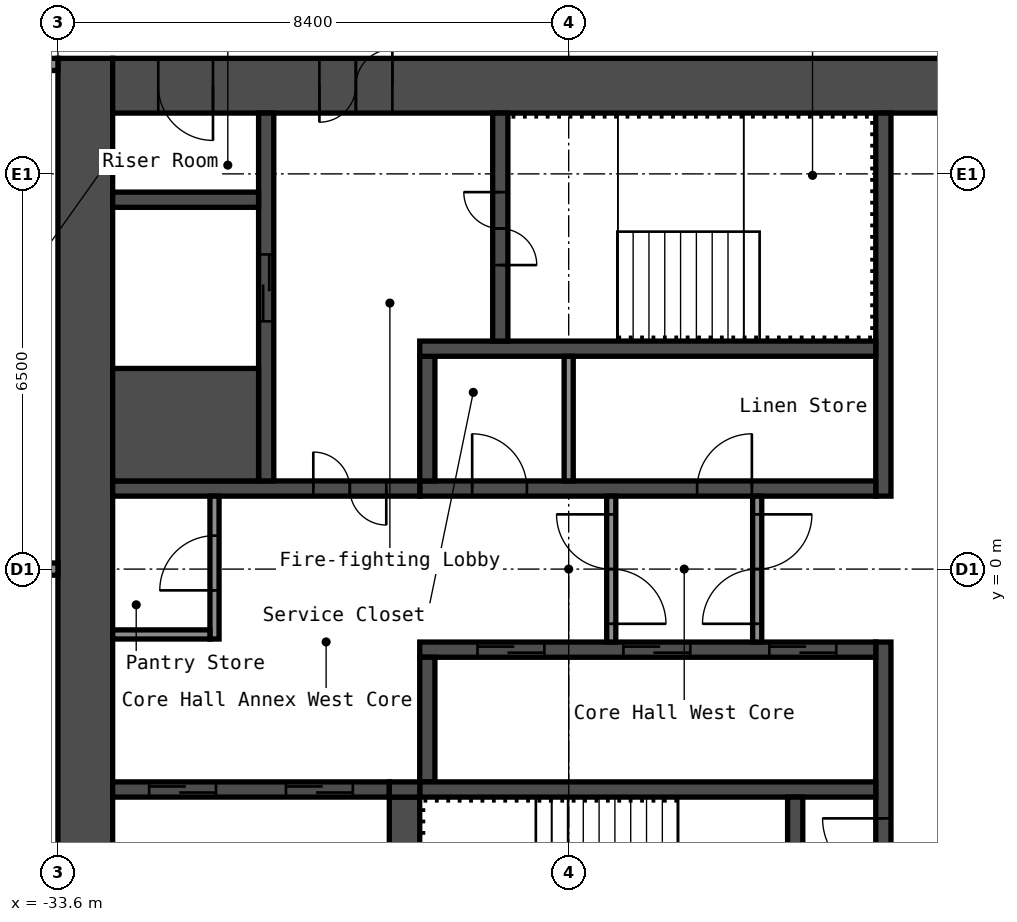
"""IFC4 building model, lengths in metres.
Left out: names, types, materials, properties, quantities, classifications, styles, units other than length and angle.
Written with IfcOpenShell. Run it as: python <this file> out.ifc"""

import sys

from ifc_helpers import new_model, si_unit, direction, frame, frame_2d, origin, place, context, subcontext, project, spatial, rectangle, extrude, element, fill, save


model = new_model("IFC4")
c1 = context("Model", 3, precision=1e-05, world=origin(), true_north=direction((0.0, 1.0)))
c2 = subcontext(c1, "Body", "Model", "MODEL_VIEW")
j1 = project(units=[si_unit("LENGTHUNIT", "METRE"), si_unit("PLANEANGLEUNIT", "RADIAN")], contexts=[c1])
p1 = place(None, origin())
s1 = spatial("IfcSite", under=j1, at=p1, CompositionType="ELEMENT")
p2 = place(p1, origin())
s2 = spatial("IfcBuilding", under=s1, at=p2, CompositionType="ELEMENT")
p3 = place(p2, frame((0.0, 0.0, 147.0)))
s3 = spatial("IfcBuildingStorey", under=s2, at=p3, CompositionType="ELEMENT", Elevation=147.0)
p4 = place(p3, frame((-33.15, -8.4, 0.0), z_axis=(0.0, 0.0, 1.0), x_axis=(0.0, 1.0, 0.0)))
e1 = element("IfcWall", 1, at=p4, inside=s3, PredefinedType="SHEAR", context=c2, shape_type="SweptSolid", body=[
    extrude(rectangle(XDim=16.8, YDim=0.9, at=frame_2d((8.4, 0.0))), origin(), (0.0, 0.0, 1.0), 2.75),
])
p5 = place(p3, frame((-32.7, 7.95, 0.0), z_axis=(0.0, 0.0, 1.0), x_axis=(1.0, 0.0, 0.0)))
e2 = element("IfcWall", 2, at=p5, inside=s3, PredefinedType="SHEAR", context=c2, shape_type="SweptSolid", body=[
    extrude(rectangle(XDim=15.0, YDim=0.9, at=frame_2d((7.5, 0.0))), origin(), (0.0, 0.0, 1.0), 2.75),
])
p6 = place(p5, frame((3.4, 0.0, 0.0)))
e3 = element("IfcOpeningElement", 3, at=p6, cuts=e2, PredefinedType="OPENING", context=c2, shape_type="SweptSolid", body=[
    extrude(rectangle(XDim=1.2, YDim=2.1, at=frame_2d((0.6, 1.05))), frame((0.0, 0.46, 0.0), z_axis=(0.0, -1.0, 0.0), x_axis=(1.0, 0.0, 0.0)), (0.0, 0.0, 1.0), 0.92),
])
p7 = place(p5, frame((0.75, 0.0, 0.0)))
e4 = element("IfcOpeningElement", 4, at=p7, cuts=e2, PredefinedType="OPENING", context=c2, shape_type="SweptSolid", body=[
    extrude(rectangle(XDim=0.9, YDim=2.1, at=frame_2d((0.45, 1.05))), frame((0.0, 0.46, 0.0), z_axis=(0.0, -1.0, 0.0), x_axis=(1.0, 0.0, 0.0)), (0.0, 0.0, 1.0), 0.92),
])
p8 = place(p3, frame((-20.025, 1.2, 0.0), z_axis=(0.0, 0.0, 1.0), x_axis=(0.0, 1.0, 0.0)))
e5 = element("IfcWall", 5, at=p8, inside=s3, PredefinedType="SHEAR", context=c2, shape_type="SweptSolid", body=[
    extrude(rectangle(XDim=6.3, YDim=0.25, at=frame_2d((3.15, 0.0))), origin(), (0.0, 0.0, 1.0), 2.75),
])
p9 = place(p3, frame((-20.025, -7.5, 0.0), z_axis=(0.0, 0.0, 1.0), x_axis=(0.0, 1.0, 0.0)))
e6 = element("IfcWall", 6, at=p9, inside=s3, PredefinedType="SHEAR", context=c2, shape_type="SweptSolid", body=[
    extrude(rectangle(XDim=6.3, YDim=0.25, at=frame_2d((3.15, 0.0))), origin(), (0.0, 0.0, 1.0), 2.75),
])
p10 = place(p9, frame((2.4, 0.0, 0.0)))
e7 = element("IfcOpeningElement", 7, at=p10, cuts=e6, PredefinedType="OPENING", context=c2, shape_type="SweptSolid", body=[
    extrude(rectangle(XDim=1.0, YDim=2.1, at=frame_2d((0.5, 1.05))), frame((0.0, 0.135, 0.0), z_axis=(0.0, -1.0, 0.0), x_axis=(1.0, 0.0, 0.0)), (0.0, 0.0, 1.0), 0.27),
])
p11 = place(p3, frame((-27.65, 1.325, 0.0), z_axis=(0.0, 0.0, 1.0), x_axis=(1.0, 0.0, 0.0)))
e8 = element("IfcWall", 8, at=p11, inside=s3, PredefinedType="SHEAR", context=c2, shape_type="SweptSolid", body=[
    extrude(rectangle(XDim=7.5, YDim=0.25, at=frame_2d((3.75, 0.0))), origin(), (0.0, 0.0, 1.0), 2.75),
])
p12 = place(p11, frame((4.562, 0.0, 0.0)))
e9 = element("IfcOpeningElement", 9, at=p12, cuts=e8, PredefinedType="OPENING", context=c2, shape_type="SweptSolid", body=[
    extrude(rectangle(XDim=0.9, YDim=2.1, at=frame_2d((0.45, 1.05))), frame((0.0, 0.135, 0.0), z_axis=(0.0, -1.0, 0.0), x_axis=(1.0, 0.0, 0.0)), (0.0, 0.0, 1.0), 0.27),
])
p13 = place(p11, frame((0.863, 0.0, 0.0)))
e10 = element("IfcOpeningElement", 10, at=p13, cuts=e8, PredefinedType="OPENING", context=c2, shape_type="SweptSolid", body=[
    extrude(rectangle(XDim=0.9, YDim=2.1, at=frame_2d((0.45, 1.05))), frame((0.0, 0.135, 0.0), z_axis=(0.0, -1.0, 0.0), x_axis=(1.0, 0.0, 0.0)), (0.0, 0.0, 1.0), 0.27),
])
p14 = place(p3, frame((-27.525, 1.45, 0.0), z_axis=(0.0, 0.0, 1.0), x_axis=(0.0, 1.0, 0.0)))
e11 = element("IfcWall", 11, at=p14, inside=s3, PredefinedType="SHEAR", context=c2, shape_type="SweptSolid", body=[
    extrude(rectangle(XDim=2.05, YDim=0.25, at=frame_2d((1.025, 0.0))), origin(), (0.0, 0.0, 1.0), 2.75),
])
p15 = place(p3, frame((-27.65, 3.625, 0.0), z_axis=(0.0, 0.0, 1.0), x_axis=(1.0, 0.0, 0.0)))
e12 = element("IfcWall", 12, at=p15, inside=s3, PredefinedType="SHEAR", context=c2, shape_type="SweptSolid", body=[
    extrude(rectangle(XDim=7.5, YDim=0.25, at=frame_2d((3.75, 0.0))), origin(), (0.0, 0.0, 1.0), 2.75),
])
p16 = place(p3, frame((-26.325, 3.75, 0.0), z_axis=(0.0, 0.0, 1.0), x_axis=(0.0, 1.0, 0.0)))
e13 = element("IfcWall", 13, at=p16, inside=s3, PredefinedType="SHEAR", context=c2, shape_type="SweptSolid", body=[
    extrude(rectangle(XDim=3.75, YDim=0.25, at=frame_2d((1.875, 0.0))), origin(), (0.0, 0.0, 1.0), 2.75),
])
p17 = place(p16, frame((1.25, 0.0, 0.0)))
e14 = element("IfcOpeningElement", 14, at=p17, cuts=e13, PredefinedType="OPENING", context=c2, shape_type="SweptSolid", body=[
    extrude(rectangle(XDim=1.2, YDim=2.1, at=frame_2d((0.6, 1.05))), frame((0.0, 0.135, 0.0), z_axis=(0.0, -1.0, 0.0), x_axis=(1.0, 0.0, 0.0)), (0.0, 0.0, 1.0), 0.27),
])
p18 = place(p3, frame((-32.7, 1.325, 0.0), z_axis=(0.0, 0.0, 1.0), x_axis=(1.0, 0.0, 0.0)))
e15 = element("IfcWall", 15, at=p18, inside=s3, PredefinedType="SHEAR", context=c2, shape_type="SweptSolid", body=[
    extrude(rectangle(XDim=5.05, YDim=0.25, at=frame_2d((2.525, 0.0))), origin(), (0.0, 0.0, 1.0), 2.75),
])
p19 = place(p18, frame((3.3, 0.0, 0.0)))
e16 = element("IfcOpeningElement", 16, at=p19, cuts=e15, PredefinedType="OPENING", context=c2, shape_type="SweptSolid", body=[
    extrude(rectangle(XDim=1.2, YDim=2.1, at=frame_2d((0.6, 1.05))), frame((0.0, 0.135, 0.0), z_axis=(0.0, -1.0, 0.0), x_axis=(1.0, 0.0, 0.0)), (0.0, 0.0, 1.0), 0.27),
])
p20 = place(p3, frame((-30.175, 1.45, 0.0), z_axis=(0.0, 0.0, 1.0), x_axis=(0.0, 1.0, 0.0)))
e17 = element("IfcWall", 17, at=p20, inside=s3, PredefinedType="SHEAR", context=c2, shape_type="SweptSolid", body=[
    extrude(rectangle(XDim=6.05, YDim=0.25, at=frame_2d((3.025, 0.0))), origin(), (0.0, 0.0, 1.0), 2.75),
])
p21 = place(p20, frame((2.625, 0.0, 0.0)))
e18 = element("IfcOpeningElement", 18, at=p21, cuts=e17, PredefinedType="OPENING", context=c2, shape_type="SweptSolid", body=[
    extrude(rectangle(XDim=1.1, YDim=2.1, at=frame_2d((0.55, 1.05))), frame((0.0, 0.135, 0.0), z_axis=(0.0, -1.0, 0.0), x_axis=(1.0, 0.0, 0.0)), (0.0, 0.0, 1.0), 0.27),
])
p22 = place(p3, frame((-32.7, 2.375, 0.0), z_axis=(0.0, 0.0, 1.0), x_axis=(1.0, 0.0, 0.0)))
e19 = element("IfcWall", 19, at=p22, inside=s3, PredefinedType="SHEAR", context=c2, shape_type="SweptSolid", body=[
    extrude(rectangle(XDim=2.4, YDim=1.85, at=frame_2d((1.2, 0.0))), origin(), (0.0, 0.0, 1.0), 2.75),
])
p23 = place(p3, frame((-32.7, 6.075, 0.0), z_axis=(0.0, 0.0, 1.0), x_axis=(1.0, 0.0, 0.0)))
e20 = element("IfcWall", 20, at=p23, inside=s3, PredefinedType="SHEAR", context=c2, shape_type="SweptSolid", body=[
    extrude(rectangle(XDim=2.4, YDim=0.25, at=frame_2d((1.2, 0.0))), origin(), (0.0, 0.0, 1.0), 2.75),
])
p24 = place(p3, frame((-27.65, -1.325, 0.0), z_axis=(0.0, 0.0, 1.0), x_axis=(1.0, 0.0, 0.0)))
e21 = element("IfcWall", 21, at=p24, inside=s3, PredefinedType="SHEAR", context=c2, shape_type="SweptSolid", body=[
    extrude(rectangle(XDim=7.5, YDim=0.25, at=frame_2d((3.75, 0.0))), origin(), (0.0, 0.0, 1.0), 2.75),
])
p25 = place(p24, frame((5.75, 0.0, 0.0)))
e22 = element("IfcOpeningElement", 22, at=p25, cuts=e21, PredefinedType="OPENING", context=c2, shape_type="SweptSolid", body=[
    extrude(rectangle(XDim=1.1, YDim=2.1, at=frame_2d((0.55, 1.05))), frame((0.0, 0.135, 0.0), z_axis=(0.0, -1.0, 0.0), x_axis=(1.0, 0.0, 0.0)), (0.0, 0.0, 1.0), 0.27),
])
p26 = place(p24, frame((3.35, 0.0, 0.0)))
e23 = element("IfcOpeningElement", 23, at=p26, cuts=e21, PredefinedType="OPENING", context=c2, shape_type="SweptSolid", body=[
    extrude(rectangle(XDim=1.1, YDim=2.1, at=frame_2d((0.55, 1.05))), frame((0.0, 0.135, 0.0), z_axis=(0.0, -1.0, 0.0), x_axis=(1.0, 0.0, 0.0)), (0.0, 0.0, 1.0), 0.27),
])
p27 = place(p24, frame((0.95, 0.0, 0.0)))
e24 = element("IfcOpeningElement", 24, at=p27, cuts=e21, PredefinedType="OPENING", context=c2, shape_type="SweptSolid", body=[
    extrude(rectangle(XDim=1.1, YDim=2.1, at=frame_2d((0.55, 1.05))), frame((0.0, 0.135, 0.0), z_axis=(0.0, -1.0, 0.0), x_axis=(1.0, 0.0, 0.0)), (0.0, 0.0, 1.0), 0.27),
])
p28 = place(p3, frame((-27.525, -3.5, 0.0), z_axis=(0.0, 0.0, 1.0), x_axis=(0.0, 1.0, 0.0)))
e25 = element("IfcWall", 25, at=p28, inside=s3, PredefinedType="SHEAR", context=c2, shape_type="SweptSolid", body=[
    extrude(rectangle(XDim=2.05, YDim=0.25, at=frame_2d((1.025, 0.0))), origin(), (0.0, 0.0, 1.0), 2.75),
])
p29 = place(p3, frame((-27.65, -3.625, 0.0), z_axis=(0.0, 0.0, 1.0), x_axis=(1.0, 0.0, 0.0)))
e26 = element("IfcWall", 26, at=p29, inside=s3, PredefinedType="SHEAR", context=c2, shape_type="SweptSolid", body=[
    extrude(rectangle(XDim=7.5, YDim=0.25, at=frame_2d((3.75, 0.0))), origin(), (0.0, 0.0, 1.0), 2.75),
])
p30 = place(p3, frame((-21.475, -7.5, 0.0), z_axis=(0.0, 0.0, 1.0), x_axis=(0.0, 1.0, 0.0)))
e27 = element("IfcWall", 27, at=p30, inside=s3, PredefinedType="SHEAR", context=c2, shape_type="SweptSolid", body=[
    extrude(rectangle(XDim=3.75, YDim=0.25, at=frame_2d((1.875, 0.0))), origin(), (0.0, 0.0, 1.0), 2.75),
])
p31 = place(p30, frame((1.3, 0.0, 0.0)))
e28 = element("IfcOpeningElement", 28, at=p31, cuts=e27, PredefinedType="OPENING", context=c2, shape_type="SweptSolid", body=[
    extrude(rectangle(XDim=1.2, YDim=2.1, at=frame_2d((0.6, 1.05))), frame((0.0, 0.135, 0.0), z_axis=(0.0, -1.0, 0.0), x_axis=(1.0, 0.0, 0.0)), (0.0, 0.0, 1.0), 0.27),
])
p32 = place(p3, frame((-27.9, -7.5, 0.0), z_axis=(0.0, 0.0, 1.0), x_axis=(0.0, 1.0, 0.0)))
e29 = element("IfcWall", 29, at=p32, inside=s3, PredefinedType="SHEAR", context=c2, shape_type="SweptSolid", body=[
    extrude(rectangle(XDim=3.75, YDim=0.5, at=frame_2d((1.875, 0.0))), origin(), (0.0, 0.0, 1.0), 2.75),
])
p33 = place(p3, frame((-32.7, -3.625, 0.0), z_axis=(0.0, 0.0, 1.0), x_axis=(1.0, 0.0, 0.0)))
e30 = element("IfcWall", 30, at=p33, inside=s3, PredefinedType="SHEAR", context=c2, shape_type="SweptSolid", body=[
    extrude(rectangle(XDim=4.55, YDim=0.25, at=frame_2d((2.275, 0.0))), origin(), (0.0, 0.0, 1.0), 2.75),
])
p34 = place(p33, frame((2.85, 0.0, 0.0)))
e31 = element("IfcOpeningElement", 31, at=p34, cuts=e30, PredefinedType="OPENING", context=c2, shape_type="SweptSolid", body=[
    extrude(rectangle(XDim=1.1, YDim=2.1, at=frame_2d((0.55, 1.05))), frame((0.0, 0.135, 0.0), z_axis=(0.0, -1.0, 0.0), x_axis=(1.0, 0.0, 0.0)), (0.0, 0.0, 1.0), 0.27),
])
p35 = place(p33, frame((0.6, 0.0, 0.0)))
e32 = element("IfcOpeningElement", 32, at=p35, cuts=e30, PredefinedType="OPENING", context=c2, shape_type="SweptSolid", body=[
    extrude(rectangle(XDim=1.1, YDim=2.1, at=frame_2d((0.55, 1.05))), frame((0.0, 0.135, 0.0), z_axis=(0.0, -1.0, 0.0), x_axis=(1.0, 0.0, 0.0)), (0.0, 0.0, 1.0), 0.27),
])
p36 = place(p3, frame((-28.15, -3.625, 0.0), z_axis=(0.0, 0.0, 1.0), x_axis=(1.0, 0.0, 0.0)))
e33 = element("IfcWall", 33, at=p36, inside=s3, PredefinedType="SHEAR", context=c2, shape_type="SweptSolid", body=[
    extrude(rectangle(XDim=0.5, YDim=0.25, at=frame_2d((0.25, 0.0))), origin(), (0.0, 0.0, 1.0), 2.75),
])
p37 = place(p3, frame((-22.1, -1.2, 0.0), z_axis=(0.0, 0.0, 1.0), x_axis=(0.0, 1.0, 0.0)))
e34 = element("IfcWall", 34, at=p37, inside=s3, PredefinedType="PARTITIONING", context=c2, shape_type="SweptSolid", body=[
    extrude(rectangle(XDim=2.4, YDim=0.15, at=frame_2d((1.2, 0.0))), origin(), (0.0, 0.0, 1.0), 2.75),
])
p38 = place(p37, frame((0.3, 0.0, 0.0)))
e35 = element("IfcOpeningElement", 35, at=p38, cuts=e34, PredefinedType="OPENING", context=c2, shape_type="SweptSolid", body=[
    extrude(rectangle(XDim=1.8, YDim=2.1, at=frame_2d((0.9, 1.05))), frame((0.0, 0.085, 0.0), z_axis=(0.0, -1.0, 0.0), x_axis=(1.0, 0.0, 0.0)), (0.0, 0.0, 1.0), 0.17),
])
p39 = place(p3, frame((-24.5, -1.2, 0.0), z_axis=(0.0, 0.0, 1.0), x_axis=(0.0, 1.0, 0.0)))
e36 = element("IfcWall", 36, at=p39, inside=s3, PredefinedType="PARTITIONING", context=c2, shape_type="SweptSolid", body=[
    extrude(rectangle(XDim=2.4, YDim=0.15, at=frame_2d((1.2, 0.0))), origin(), (0.0, 0.0, 1.0), 2.75),
])
p40 = place(p39, frame((0.3, 0.0, 0.0)))
e37 = element("IfcOpeningElement", 37, at=p40, cuts=e36, PredefinedType="OPENING", context=c2, shape_type="SweptSolid", body=[
    extrude(rectangle(XDim=1.8, YDim=2.1, at=frame_2d((0.9, 1.05))), frame((0.0, 0.085, 0.0), z_axis=(0.0, -1.0, 0.0), x_axis=(1.0, 0.0, 0.0)), (0.0, 0.0, 1.0), 0.17),
])
p41 = place(p3, frame((-31.025, -1.15, 0.0), z_axis=(0.0, 0.0, 1.0), x_axis=(0.0, 1.0, 0.0)))
e38 = element("IfcWall", 38, at=p41, inside=s3, PredefinedType="PARTITIONING", context=c2, shape_type="SweptSolid", body=[
    extrude(rectangle(XDim=2.35, YDim=0.15, at=frame_2d((1.175, 0.0))), origin(), (0.0, 0.0, 1.0), 2.75),
])
p42 = place(p41, frame((0.8, 0.0, 0.0)))
e39 = element("IfcOpeningElement", 39, at=p42, cuts=e38, PredefinedType="OPENING", context=c2, shape_type="SweptSolid", body=[
    extrude(rectangle(XDim=0.9, YDim=2.1, at=frame_2d((0.45, 1.05))), frame((0.0, 0.085, 0.0), z_axis=(0.0, -1.0, 0.0), x_axis=(1.0, 0.0, 0.0)), (0.0, 0.0, 1.0), 0.17),
])
p43 = place(p3, frame((-32.7, -1.075, 0.0), z_axis=(0.0, 0.0, 1.0), x_axis=(1.0, 0.0, 0.0)))
e40 = element("IfcWall", 40, at=p43, inside=s3, PredefinedType="PARTITIONING", context=c2, shape_type="SweptSolid", body=[
    extrude(rectangle(XDim=1.6, YDim=0.15, at=frame_2d((0.8, 0.0))), origin(), (0.0, 0.0, 1.0), 2.75),
])
p44 = place(p3, frame((-25.2, 1.45, 0.0), z_axis=(0.0, 0.0, 1.0), x_axis=(0.0, 1.0, 0.0)))
e41 = element("IfcWall", 41, at=p44, inside=s3, PredefinedType="PARTITIONING", context=c2, shape_type="SweptSolid", body=[
    extrude(rectangle(XDim=2.05, YDim=0.15, at=frame_2d((1.025, 0.0))), origin(), (0.0, 0.0, 1.0), 2.75),
])
p45 = place(p3, frame((-40.1, 0.0, 0.0), z_axis=(0.0, 0.0, 1.0), x_axis=(1.0, 0.0, 0.0)))
e42 = element("IfcWall", 42, at=p45, inside=s3, PredefinedType="PARTITIONING", context=c2, shape_type="SweptSolid", body=[
    extrude(rectangle(XDim=6.5, YDim=0.2, at=frame_2d((3.25, 0.0))), origin(), (0.0, 0.0, 1.0), 2.75),
])
p46 = place(p3, frame((-40.2, 8.3, 0.0), z_axis=(0.0, 0.0, 1.0), x_axis=(1.0, 0.0, 0.0)))
e43 = element("IfcWall", 43, at=p46, inside=s3, PredefinedType="PARTITIONING", context=c2, shape_type="SweptSolid", body=[
    extrude(rectangle(XDim=6.6, YDim=0.2, at=frame_2d((3.3, 0.0))), origin(), (0.0, 0.0, 1.0), 2.75),
])
p47 = place(p46, frame((1.53, 0.0, 0.0)))
e44 = element("IfcOpeningElement", 44, at=p47, cuts=e43, PredefinedType="OPENING", context=c2, shape_type="SweptSolid", body=[
    extrude(rectangle(XDim=0.9, YDim=2.1, at=frame_2d((0.45, 1.05))), frame((0.0, 0.11, 0.0), z_axis=(0.0, -1.0, 0.0), x_axis=(1.0, 0.0, 0.0)), (0.0, 0.0, 1.0), 0.22),
])
p48 = place(p46, frame((4.83, 0.0, 0.0)))
e45 = element("IfcOpeningElement", 45, at=p48, cuts=e43, PredefinedType="OPENING", context=c2, shape_type="SweptSolid", body=[
    extrude(rectangle(XDim=0.9, YDim=2.1, at=frame_2d((0.45, 1.05))), frame((0.0, 0.11, 0.0), z_axis=(0.0, -1.0, 0.0), x_axis=(1.0, 0.0, 0.0)), (0.0, 0.0, 1.0), 0.22),
])
p49 = place(p6, origin())
e46 = element("IfcDoor", 46, at=p49, inside=s3, OperationType="DOUBLE_DOOR_SINGLE_SWING", PredefinedType="DOOR", context=c2, shape_type="SweptSolid", body=[
    extrude(rectangle(XDim=1.2, YDim=2.1, at=frame_2d((0.6, 1.05))), frame((0.0, 0.025, 0.0), z_axis=(0.0, -1.0, 0.0), x_axis=(1.0, 0.0, 0.0)), (0.0, 0.0, 1.0), 0.05),
])
fill(e3, e46)
p50 = place(p7, origin())
e47 = element("IfcDoor", 47, at=p50, inside=s3, OperationType="SINGLE_SWING_RIGHT", PredefinedType="DOOR", context=c2, shape_type="SweptSolid", body=[
    extrude(rectangle(XDim=0.9, YDim=2.1, at=frame_2d((0.45, 1.05))), frame((0.0, 0.025, 0.0), z_axis=(0.0, -1.0, 0.0), x_axis=(1.0, 0.0, 0.0)), (0.0, 0.0, 1.0), 0.05),
])
fill(e4, e47)
p51 = place(p17, origin())
e48 = element("IfcDoor", 48, at=p51, inside=s3, OperationType="DOUBLE_DOOR_SINGLE_SWING", PredefinedType="DOOR", context=c2, shape_type="SweptSolid", body=[
    extrude(rectangle(XDim=1.2, YDim=2.1, at=frame_2d((0.6, 1.05))), frame((0.0, 0.025, 0.0), z_axis=(0.0, -1.0, 0.0), x_axis=(1.0, 0.0, 0.0)), (0.0, 0.0, 1.0), 0.05),
])
fill(e14, e48)
p52 = place(p10, origin())
e49 = element("IfcDoor", 49, at=p52, inside=s3, OperationType="SINGLE_SWING_LEFT", PredefinedType="DOOR", context=c2, shape_type="SweptSolid", body=[
    extrude(rectangle(XDim=1.0, YDim=2.1, at=frame_2d((0.5, 1.05))), frame((0.0, 0.025, 0.0), z_axis=(0.0, -1.0, 0.0), x_axis=(1.0, 0.0, 0.0)), (0.0, 0.0, 1.0), 0.05),
])
fill(e7, e49)
p53 = place(p19, origin())
e50 = element("IfcDoor", 50, at=p53, inside=s3, OperationType="DOUBLE_DOOR_SINGLE_SWING", PredefinedType="DOOR", context=c2, shape_type="SweptSolid", body=[
    extrude(rectangle(XDim=1.2, YDim=2.1, at=frame_2d((0.6, 1.05))), frame((0.0, 0.025, 0.0), z_axis=(0.0, -1.0, 0.0), x_axis=(1.0, 0.0, 0.0)), (0.0, 0.0, 1.0), 0.05),
])
fill(e16, e50)
p54 = place(p38, origin())
e51 = element("IfcDoor", 51, at=p54, inside=s3, OperationType="DOUBLE_DOOR_SINGLE_SWING", PredefinedType="DOOR", context=c2, shape_type="SweptSolid", body=[
    extrude(rectangle(XDim=1.8, YDim=2.1, at=frame_2d((0.9, 1.05))), frame((0.0, 0.025, 0.0), z_axis=(0.0, -1.0, 0.0), x_axis=(1.0, 0.0, 0.0)), (0.0, 0.0, 1.0), 0.05),
])
fill(e35, e51)
p55 = place(p40, origin())
e52 = element("IfcDoor", 52, at=p55, inside=s3, OperationType="DOUBLE_DOOR_SINGLE_SWING", PredefinedType="DOOR", context=c2, shape_type="SweptSolid", body=[
    extrude(rectangle(XDim=1.8, YDim=2.1, at=frame_2d((0.9, 1.05))), frame((0.0, 0.025, 0.0), z_axis=(0.0, -1.0, 0.0), x_axis=(1.0, 0.0, 0.0)), (0.0, 0.0, 1.0), 0.05),
])
fill(e37, e52)
p56 = place(p42, origin())
e53 = element("IfcDoor", 53, at=p56, inside=s3, OperationType="SINGLE_SWING_RIGHT", PredefinedType="DOOR", context=c2, shape_type="SweptSolid", body=[
    extrude(rectangle(XDim=0.9, YDim=2.1, at=frame_2d((0.45, 1.05))), frame((0.0, 0.025, 0.0), z_axis=(0.0, -1.0, 0.0), x_axis=(1.0, 0.0, 0.0)), (0.0, 0.0, 1.0), 0.05),
])
fill(e39, e53)
p57 = place(p12, origin())
e54 = element("IfcDoor", 54, at=p57, inside=s3, OperationType="SINGLE_SWING_LEFT", PredefinedType="DOOR", context=c2, shape_type="SweptSolid", body=[
    extrude(rectangle(XDim=0.9, YDim=2.1, at=frame_2d((0.45, 1.05))), frame((0.0, 0.025, 0.0), z_axis=(0.0, -1.0, 0.0), x_axis=(1.0, 0.0, 0.0)), (0.0, 0.0, 1.0), 0.05),
])
fill(e9, e54)
p58 = place(p13, origin())
e55 = element("IfcDoor", 55, at=p58, inside=s3, OperationType="SINGLE_SWING_RIGHT", PredefinedType="DOOR", context=c2, shape_type="SweptSolid", body=[
    extrude(rectangle(XDim=0.9, YDim=2.1, at=frame_2d((0.45, 1.05))), frame((0.0, 0.025, 0.0), z_axis=(0.0, -1.0, 0.0), x_axis=(1.0, 0.0, 0.0)), (0.0, 0.0, 1.0), 0.05),
])
fill(e10, e55)
p59 = place(p25, origin())
e56 = element("IfcDoor", 56, at=p59, inside=s3, OperationType="DOUBLE_DOOR_SLIDING", PredefinedType="DOOR", context=c2, shape_type="SweptSolid", body=[
    extrude(rectangle(XDim=1.1, YDim=2.1, at=frame_2d((0.55, 1.05))), frame((0.0, 0.025, 0.0), z_axis=(0.0, -1.0, 0.0), x_axis=(1.0, 0.0, 0.0)), (0.0, 0.0, 1.0), 0.05),
])
fill(e22, e56)
p60 = place(p26, origin())
e57 = element("IfcDoor", 57, at=p60, inside=s3, OperationType="DOUBLE_DOOR_SLIDING", PredefinedType="DOOR", context=c2, shape_type="SweptSolid", body=[
    extrude(rectangle(XDim=1.1, YDim=2.1, at=frame_2d((0.55, 1.05))), frame((0.0, 0.025, 0.0), z_axis=(0.0, -1.0, 0.0), x_axis=(1.0, 0.0, 0.0)), (0.0, 0.0, 1.0), 0.05),
])
fill(e23, e57)
p61 = place(p27, origin())
e58 = element("IfcDoor", 58, at=p61, inside=s3, OperationType="DOUBLE_DOOR_SLIDING", PredefinedType="DOOR", context=c2, shape_type="SweptSolid", body=[
    extrude(rectangle(XDim=1.1, YDim=2.1, at=frame_2d((0.55, 1.05))), frame((0.0, 0.025, 0.0), z_axis=(0.0, -1.0, 0.0), x_axis=(1.0, 0.0, 0.0)), (0.0, 0.0, 1.0), 0.05),
])
fill(e24, e58)
p62 = place(p21, origin())
e59 = element("IfcDoor", 59, at=p62, inside=s3, OperationType="DOUBLE_DOOR_SLIDING", PredefinedType="DOOR", context=c2, shape_type="SweptSolid", body=[
    extrude(rectangle(XDim=1.1, YDim=2.1, at=frame_2d((0.55, 1.05))), frame((0.0, 0.025, 0.0), z_axis=(0.0, -1.0, 0.0), x_axis=(1.0, 0.0, 0.0)), (0.0, 0.0, 1.0), 0.05),
])
fill(e18, e59)
p63 = place(p34, origin())
e60 = element("IfcDoor", 60, at=p63, inside=s3, OperationType="DOUBLE_DOOR_SLIDING", PredefinedType="DOOR", context=c2, shape_type="SweptSolid", body=[
    extrude(rectangle(XDim=1.1, YDim=2.1, at=frame_2d((0.55, 1.05))), frame((0.0, 0.025, 0.0), z_axis=(0.0, -1.0, 0.0), x_axis=(1.0, 0.0, 0.0)), (0.0, 0.0, 1.0), 0.05),
])
fill(e31, e60)
p64 = place(p35, origin())
e61 = element("IfcDoor", 61, at=p64, inside=s3, OperationType="DOUBLE_DOOR_SLIDING", PredefinedType="DOOR", context=c2, shape_type="SweptSolid", body=[
    extrude(rectangle(XDim=1.1, YDim=2.1, at=frame_2d((0.55, 1.05))), frame((0.0, 0.025, 0.0), z_axis=(0.0, -1.0, 0.0), x_axis=(1.0, 0.0, 0.0)), (0.0, 0.0, 1.0), 0.05),
])
fill(e32, e61)
save(model, sys.argv[1])
